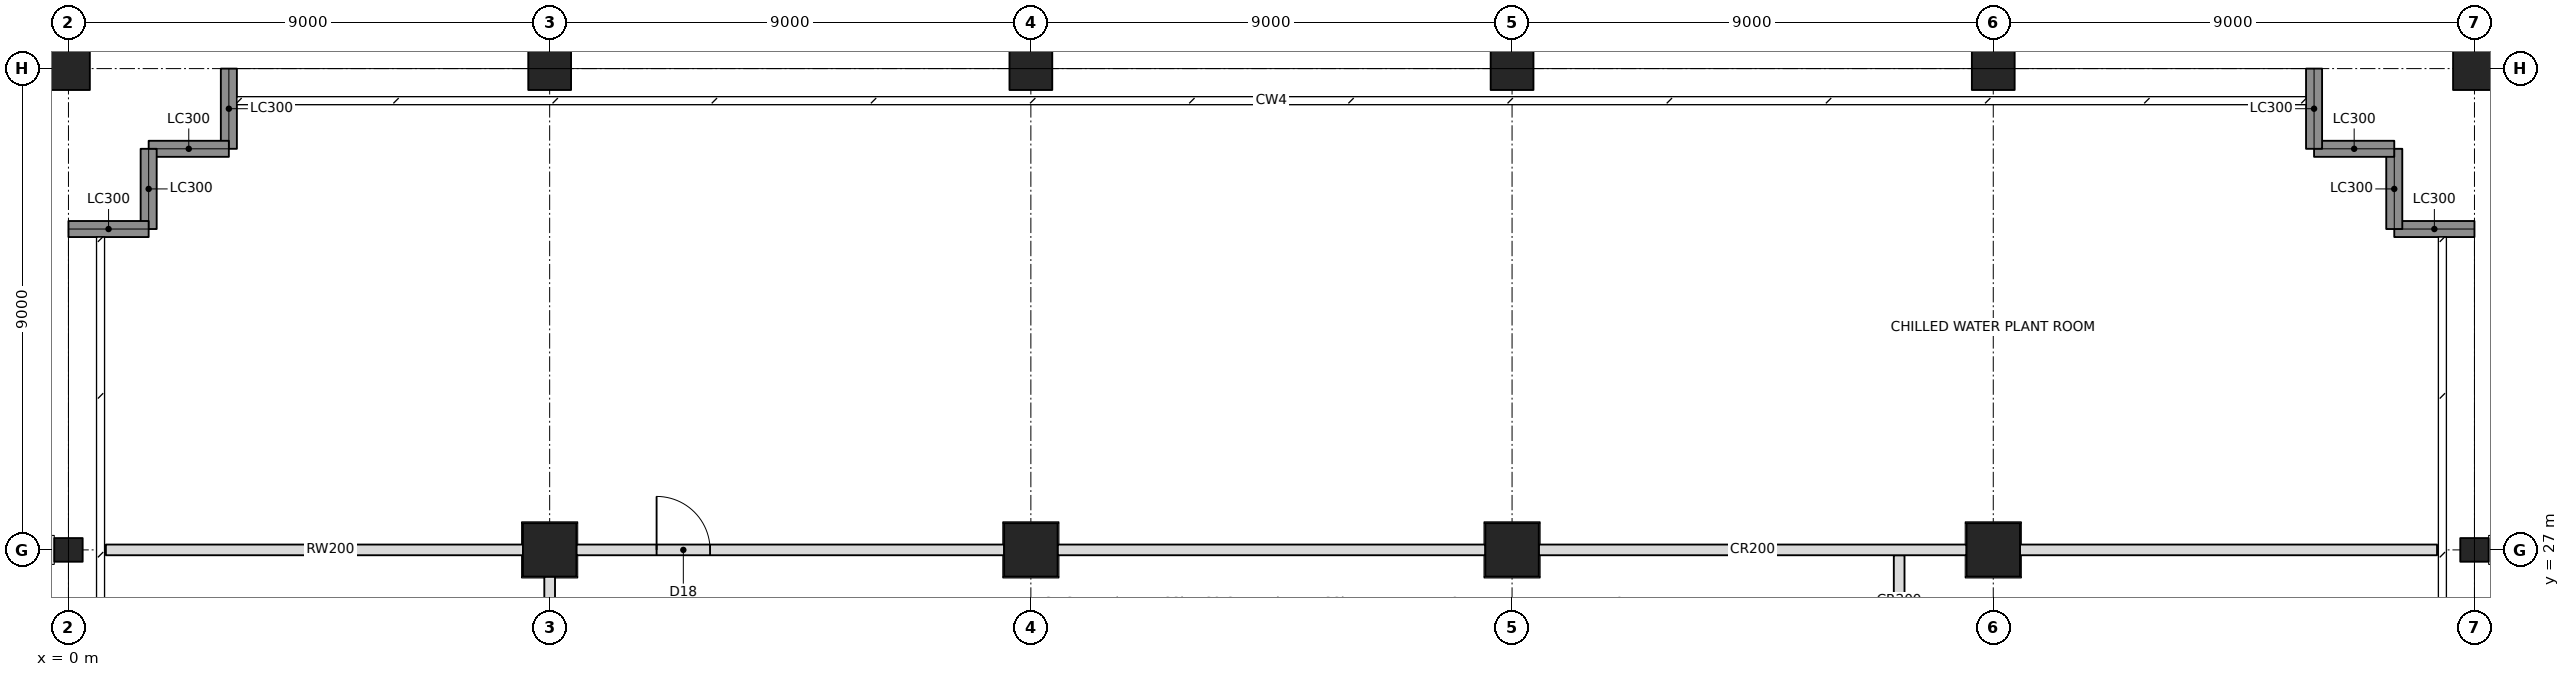
"""IFC4 building model, lengths in metres.
Left out: names, types, materials, properties, quantities, classifications, styles, units other than length and angle.
Written with IfcOpenShell. Run it as: python <this file> out.ifc"""

import sys

from ifc_helpers import new_model, si_unit, direction, frame, frame_2d, origin, origin_2d, place, context, subcontext, project, spatial, rectangle, hollow_rectangle, i_section, extrude, element, fill, save


model = new_model("IFC4")
c1 = context("Model", 3, precision=1e-05, world=origin(), true_north=direction((0.0, 1.0)))
c2 = subcontext(c1, "Body", "Model", "MODEL_VIEW")
j1 = project(units=[si_unit("LENGTHUNIT", "METRE"), si_unit("PLANEANGLEUNIT", "RADIAN")], contexts=[c1])
p1 = place(None, origin())
s1 = spatial("IfcSite", under=j1, at=p1, CompositionType="ELEMENT")
p2 = place(p1, origin())
s2 = spatial("IfcBuilding", under=s1, at=p2, CompositionType="ELEMENT")
p3 = place(p2, frame((0.0, 0.0, 155.4)))
s3 = spatial("IfcBuildingStorey", under=s2, at=p3, CompositionType="ELEMENT", Elevation=155.4)
p4 = place(p3, frame((0.0, 27.0, 0.0), z_axis=(0.0, 0.0, 1.0), x_axis=(0.0, 1.0, 0.0)))
e1 = element("IfcColumn", 1, at=p4, inside=s3, PredefinedType="COLUMN", context=c2, shape_type="SweptSolid", body=[
    extrude(i_section(OverallWidth=0.442, OverallDepth=0.531, WebThickness=0.066, FlangeThickness=0.106, at=origin_2d()), origin(), (0.0, 0.0, 1.0), 5.0),
])
p5 = place(p3, frame((0.0, 36.0, 0.0), z_axis=(0.0, 0.0, 1.0), x_axis=(1.0, 0.0, 0.0)))
e2 = element("IfcColumn", 2, at=p5, inside=s3, PredefinedType="COLUMN", context=c2, shape_type="SweptSolid", body=[
    extrude(hollow_rectangle(XDim=0.8, YDim=0.8, WallThickness=0.06, at=origin_2d()), origin(), (0.0, 0.0, 1.0), 5.0),
])
p6 = place(p3, frame((9.0, 27.0, 0.0), z_axis=(0.0, 0.0, 1.0), x_axis=(1.0, 0.0, 0.0)))
e3 = element("IfcColumn", 3, at=p6, inside=s3, PredefinedType="COLUMN", context=c2, shape_type="SweptSolid", body=[
    extrude(hollow_rectangle(XDim=1.0, YDim=1.0, WallThickness=0.1, at=origin_2d()), origin(), (0.0, 0.0, 1.0), 5.0),
])
p7 = place(p3, frame((9.0, 36.0, 0.0), z_axis=(0.0, 0.0, 1.0), x_axis=(1.0, 0.0, 0.0)))
e4 = element("IfcColumn", 4, at=p7, inside=s3, PredefinedType="COLUMN", context=c2, shape_type="SweptSolid", body=[
    extrude(hollow_rectangle(XDim=0.8, YDim=0.8, WallThickness=0.06, at=origin_2d()), origin(), (0.0, 0.0, 1.0), 5.0),
])
p8 = place(p3, frame((18.0, 27.0, 0.0), z_axis=(0.0, 0.0, 1.0), x_axis=(1.0, 0.0, 0.0)))
e5 = element("IfcColumn", 5, at=p8, inside=s3, PredefinedType="COLUMN", context=c2, shape_type="SweptSolid", body=[
    extrude(hollow_rectangle(XDim=1.0, YDim=1.0, WallThickness=0.1, at=origin_2d()), origin(), (0.0, 0.0, 1.0), 5.0),
])
p9 = place(p3, frame((18.0, 36.0, 0.0), z_axis=(0.0, 0.0, 1.0), x_axis=(1.0, 0.0, 0.0)))
e6 = element("IfcColumn", 6, at=p9, inside=s3, PredefinedType="COLUMN", context=c2, shape_type="SweptSolid", body=[
    extrude(hollow_rectangle(XDim=0.8, YDim=0.8, WallThickness=0.06, at=origin_2d()), origin(), (0.0, 0.0, 1.0), 5.0),
])
p10 = place(p3, frame((27.0, 27.0, 0.0), z_axis=(0.0, 0.0, 1.0), x_axis=(1.0, 0.0, 0.0)))
e7 = element("IfcColumn", 7, at=p10, inside=s3, PredefinedType="COLUMN", context=c2, shape_type="SweptSolid", body=[
    extrude(hollow_rectangle(XDim=1.0, YDim=1.0, WallThickness=0.1, at=origin_2d()), origin(), (0.0, 0.0, 1.0), 5.0),
])
p11 = place(p3, frame((27.0, 36.0, 0.0), z_axis=(0.0, 0.0, 1.0), x_axis=(1.0, 0.0, 0.0)))
e8 = element("IfcColumn", 8, at=p11, inside=s3, PredefinedType="COLUMN", context=c2, shape_type="SweptSolid", body=[
    extrude(hollow_rectangle(XDim=0.8, YDim=0.8, WallThickness=0.06, at=origin_2d()), origin(), (0.0, 0.0, 1.0), 5.0),
])
p12 = place(p3, frame((36.0, 27.0, 0.0), z_axis=(0.0, 0.0, 1.0), x_axis=(1.0, 0.0, 0.0)))
e9 = element("IfcColumn", 9, at=p12, inside=s3, PredefinedType="COLUMN", context=c2, shape_type="SweptSolid", body=[
    extrude(hollow_rectangle(XDim=1.0, YDim=1.0, WallThickness=0.1, at=origin_2d()), origin(), (0.0, 0.0, 1.0), 5.0),
])
p13 = place(p3, frame((36.0, 36.0, 0.0), z_axis=(0.0, 0.0, 1.0), x_axis=(1.0, 0.0, 0.0)))
e10 = element("IfcColumn", 10, at=p13, inside=s3, PredefinedType="COLUMN", context=c2, shape_type="SweptSolid", body=[
    extrude(hollow_rectangle(XDim=0.8, YDim=0.8, WallThickness=0.06, at=origin_2d()), origin(), (0.0, 0.0, 1.0), 5.0),
])
p14 = place(p3, frame((45.0, 27.0, 0.0), z_axis=(0.0, 0.0, 1.0), x_axis=(0.0, 1.0, 0.0)))
e11 = element("IfcColumn", 11, at=p14, inside=s3, PredefinedType="COLUMN", context=c2, shape_type="SweptSolid", body=[
    extrude(i_section(OverallWidth=0.442, OverallDepth=0.531, WebThickness=0.066, FlangeThickness=0.106, at=origin_2d()), origin(), (0.0, 0.0, 1.0), 5.0),
])
p15 = place(p3, frame((45.0, 36.0, 0.0), z_axis=(0.0, 0.0, 1.0), x_axis=(1.0, 0.0, 0.0)))
e12 = element("IfcColumn", 12, at=p15, inside=s3, PredefinedType="COLUMN", context=c2, shape_type="SweptSolid", body=[
    extrude(hollow_rectangle(XDim=0.8, YDim=0.8, WallThickness=0.06, at=origin_2d()), origin(), (0.0, 0.0, 1.0), 5.0),
])
p16 = place(p3, frame((45.0, 33.0, 0.0), z_axis=(0.0, 0.0, 1.0), x_axis=(-1.0, 0.0, 0.0)))
e13 = element("IfcWall", 13, at=p16, inside=s3, PredefinedType="SOLIDWALL", context=c2, shape_type="SweptSolid", body=[
    extrude(rectangle(XDim=1.5, YDim=0.3, at=frame_2d((0.75, 0.0))), origin(), (0.0, 0.0, 1.0), 3.852),
])
for number, where, z_axis, x_axis in (
    (14, (43.5, 33.0, 0.0), (0.0, 0.0, 1.0), (0.0, 1.0, 0.0)),
    (15, (43.5, 34.5, 0.0), (0.0, 0.0, 1.0), (-1.0, 0.0, 0.0)),
):
    element("IfcWall", number, at=place(p3, frame(where, z_axis=z_axis, x_axis=x_axis)), inside=s3, PredefinedType="SOLIDWALL", context=c2, shape_type="SweptSolid", body=[
        extrude(rectangle(XDim=1.5, YDim=0.3, at=frame_2d((0.75, 0.0))), origin(), (0.0, 0.0, 1.0), 4.8),
    ])
for number, where, z_axis, x_axis in (
    (16, (42.0, 34.5, 0.0), (0.0, 0.0, 1.0), (0.0, 1.0, 0.0)),
    (17, (3.0, 36.0, 0.0), (0.0, 0.0, 1.0), (0.0, -1.0, 0.0)),
):
    element("IfcWall", number, at=place(p3, frame(where, z_axis=z_axis, x_axis=x_axis)), inside=s3, PredefinedType="SOLIDWALL", context=c2, shape_type="SweptSolid", body=[
        extrude(rectangle(XDim=1.5, YDim=0.3, at=frame_2d((0.75, 0.0))), origin(), (0.0, 0.0, 1.0), 3.852),
    ])
for number, where, z_axis, x_axis in (
    (18, (3.0, 34.5, 0.0), (0.0, 0.0, 1.0), (-1.0, 0.0, 0.0)),
    (19, (1.5, 34.5, 0.0), (0.0, 0.0, 1.0), (0.0, -1.0, 0.0)),
):
    element("IfcWall", number, at=place(p3, frame(where, z_axis=z_axis, x_axis=x_axis)), inside=s3, PredefinedType="SOLIDWALL", context=c2, shape_type="SweptSolid", body=[
        extrude(rectangle(XDim=1.5, YDim=0.3, at=frame_2d((0.75, 0.0))), origin(), (0.0, 0.0, 1.0), 4.8),
    ])
p17 = place(p3, frame((1.5, 33.0, 0.0), z_axis=(0.0, 0.0, 1.0), x_axis=(-1.0, 0.0, 0.0)))
e20 = element("IfcWall", 20, at=p17, inside=s3, PredefinedType="SOLIDWALL", context=c2, shape_type="SweptSolid", body=[
    extrude(rectangle(XDim=1.5, YDim=0.3, at=frame_2d((0.75, 0.0))), origin(), (0.0, 0.0, 1.0), 3.852),
])
p18 = place(p3, frame((9.0, 18.5, 0.0), z_axis=(0.0, 0.0, 1.0), x_axis=(0.0, 1.0, 0.0)))
e21 = element("IfcWall", 21, at=p18, inside=s3, PredefinedType="PARTITIONING", context=c2, shape_type="SweptSolid", body=[
    extrude(rectangle(XDim=8.0, YDim=0.2, at=frame_2d((4.0, 0.0))), origin(), (0.0, 0.0, 1.0), 4.005),
])
p19 = place(p3, frame((0.7, 27.0, 0.0), z_axis=(0.0, 0.0, 1.0), x_axis=(1.0, 0.0, 0.0)))
e22 = element("IfcWall", 22, at=p19, inside=s3, PredefinedType="PARTITIONING", context=c2, shape_type="SweptSolid", body=[
    extrude(rectangle(XDim=8.4, YDim=0.2, at=frame_2d((4.2, 0.0))), origin(), (0.0, 0.0, 1.0), 4.005),
])
p20 = place(p3, frame((9.5, 27.0, 0.0), z_axis=(0.0, 0.0, 1.0), x_axis=(1.0, 0.0, 0.0)))
e23 = element("IfcWall", 23, at=p20, inside=s3, PredefinedType="PARTITIONING", context=c2, shape_type="SweptSolid", body=[
    extrude(rectangle(XDim=8.0, YDim=0.2, at=frame_2d((4.0, 0.0))), origin(), (0.0, 0.0, 1.0), 4.005),
])
p21 = place(p20, frame((1.5, 0.0, 0.0)))
e24 = element("IfcOpeningElement", 24, at=p21, cuts=e23, PredefinedType="OPENING", context=c2, shape_type="SweptSolid", body=[
    extrude(rectangle(XDim=1.0, YDim=2.1, at=frame_2d((0.5, 1.05))), frame((0.0, 0.11, 0.0), z_axis=(0.0, -1.0, 0.0), x_axis=(1.0, 0.0, 0.0)), (0.0, 0.0, 1.0), 0.22),
])
for number, where, z_axis, x_axis in (
    (25, (18.5, 27.0, 0.0), (0.0, 0.0, 1.0), (1.0, 0.0, 0.0)),
    (26, (27.5, 27.0, 0.0), (0.0, 0.0, 1.0), (1.0, 0.0, 0.0)),
):
    element("IfcWall", number, at=place(p3, frame(where, z_axis=z_axis, x_axis=x_axis)), inside=s3, PredefinedType="PARTITIONING", context=c2, shape_type="SweptSolid", body=[
        extrude(rectangle(XDim=8.0, YDim=0.2, at=frame_2d((4.0, 0.0))), origin(), (0.0, 0.0, 1.0), 4.005),
    ])
p22 = place(p3, frame((36.5, 27.0, 0.0), z_axis=(0.0, 0.0, 1.0), x_axis=(1.0, 0.0, 0.0)))
e27 = element("IfcWall", 27, at=p22, inside=s3, PredefinedType="PARTITIONING", context=c2, shape_type="SweptSolid", body=[
    extrude(rectangle(XDim=7.8, YDim=0.2, at=frame_2d((3.9, 0.0))), origin(), (0.0, 0.0, 1.0), 4.038),
])
p23 = place(p3, frame((34.24, 25.2, 0.0), z_axis=(0.0, 0.0, 1.0), x_axis=(0.0, 1.0, 0.0)))
e28 = element("IfcWall", 28, at=p23, inside=s3, PredefinedType="PARTITIONING", context=c2, shape_type="SweptSolid", body=[
    extrude(rectangle(XDim=1.7, YDim=0.2, at=frame_2d((0.85, 0.0))), origin(), (0.0, 0.0, 1.0), 4.004),
])
p24 = place(p21, origin())
e29 = element("IfcDoor", 29, at=p24, inside=s3, OperationType="SINGLE_SWING_LEFT", PredefinedType="DOOR", context=c2, shape_type="SweptSolid", body=[
    extrude(rectangle(XDim=1.0, YDim=2.1, at=frame_2d((0.5, 1.05))), frame((0.0, 0.025, 0.0), z_axis=(0.0, -1.0, 0.0), x_axis=(1.0, 0.0, 0.0)), (0.0, 0.0, 1.0), 0.05),
])
fill(e24, e29)
save(model, sys.argv[1])
